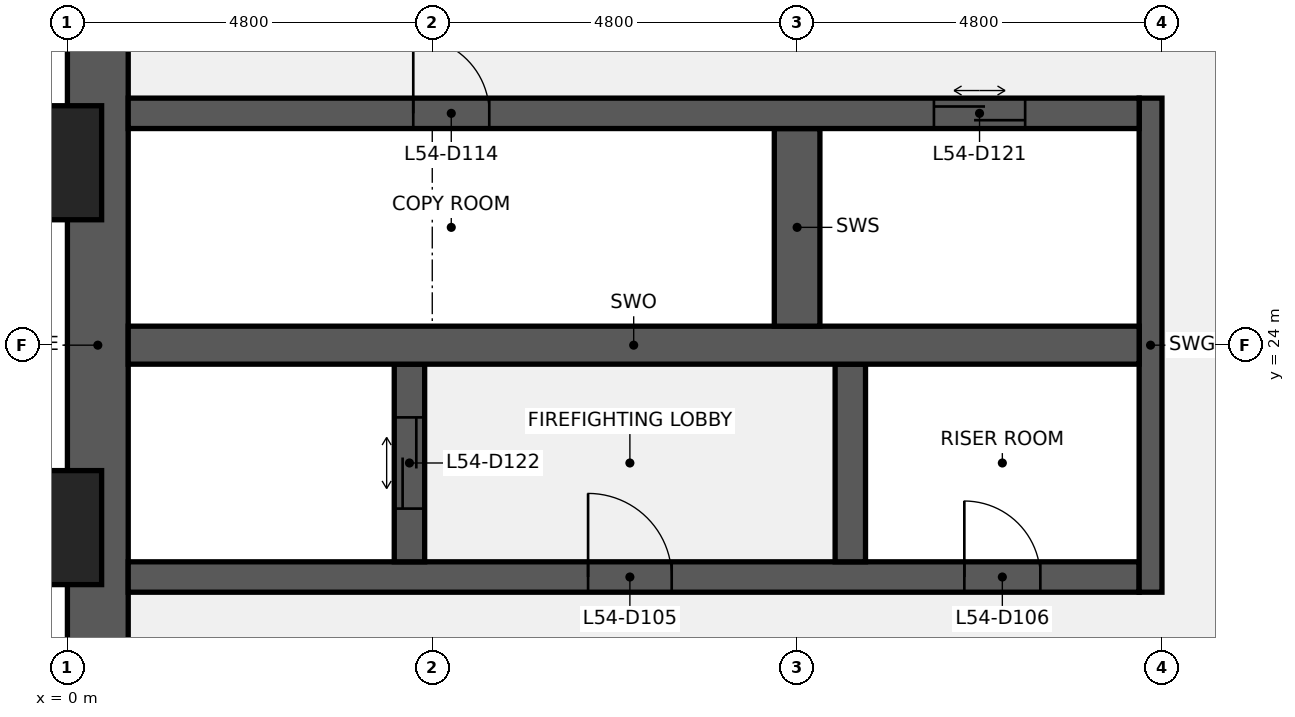
"""IFC4 building model, lengths in metres.
Left out: names, types, materials, properties, quantities, classifications, styles, units other than length and angle.
Written with IfcOpenShell. Run it as: python <this file> out.ifc"""

import sys

from ifc_helpers import new_model, si_unit, direction, frame, frame_2d, origin, origin_2d, place, context, subcontext, project, spatial, rectangle, extrude, element, fill, save


model = new_model("IFC4")
c1 = context("Model", 3, precision=1e-05, world=origin(), true_north=direction((0.0, 1.0)))
c2 = subcontext(c1, "Body", "Model", "MODEL_VIEW")
j1 = project(units=[si_unit("LENGTHUNIT", "METRE"), si_unit("PLANEANGLEUNIT", "RADIAN")], contexts=[c1])
p1 = place(None, origin())
s1 = spatial("IfcSite", under=j1, at=p1, CompositionType="ELEMENT")
p2 = place(p1, origin())
s2 = spatial("IfcBuilding", under=s1, at=p2, CompositionType="ELEMENT")
p3 = place(p2, frame((0.0, 0.0, 245.2)))
s3 = spatial("IfcBuildingStorey", under=s2, at=p3, CompositionType="ELEMENT", Elevation=245.2)
p4 = place(p3, frame((0.4, 9.6, 0.0), z_axis=(0.0, 0.0, 1.0), x_axis=(0.0, 1.0, 0.0)))
e1 = element("IfcWall", 1, at=p4, inside=s3, PredefinedType="SHEAR", context=c2, shape_type="SweptSolid", body=[
    extrude(rectangle(XDim=28.8, YDim=0.8, at=frame_2d((14.4, 0.0))), origin(), (0.0, 0.0, 1.0), 3.84),
])
p5 = place(p4, frame((8.85, 0.0, 0.9)))
e2 = element("IfcOpeningElement", 2, at=p5, cuts=e1, PredefinedType="OPENING", context=c2, shape_type="SweptSolid", body=[
    extrude(rectangle(XDim=1.5, YDim=1.5, at=frame_2d((0.75, 0.75))), frame((0.0, 0.41, 0.0), z_axis=(0.0, -1.0, 0.0), x_axis=(1.0, 0.0, 0.0)), (0.0, 0.0, 1.0), 0.82),
])
p6 = place(p4, frame((18.45, 0.0, 0.9)))
e3 = element("IfcOpeningElement", 3, at=p6, cuts=e1, PredefinedType="OPENING", context=c2, shape_type="SweptSolid", body=[
    extrude(rectangle(XDim=1.5, YDim=1.5, at=frame_2d((0.75, 0.75))), frame((0.0, 0.41, 0.0), z_axis=(0.0, -1.0, 0.0), x_axis=(1.0, 0.0, 0.0)), (0.0, 0.0, 1.0), 0.82),
])
p7 = place(p3, frame((0.8, 20.95, 0.0), z_axis=(0.0, 0.0, 1.0), x_axis=(1.0, 0.0, 0.0)))
e4 = element("IfcWall", 4, at=p7, inside=s3, PredefinedType="SHEAR", context=c2, shape_type="SweptSolid", body=[
    extrude(rectangle(XDim=13.3, YDim=0.4, at=frame_2d((6.65, 0.0))), origin(), (0.0, 0.0, 1.0), 3.84),
])
p8 = place(p7, frame((6.05, 0.0, 0.0)))
e5 = element("IfcOpeningElement", 5, at=p8, cuts=e4, PredefinedType="OPENING", context=c2, shape_type="SweptSolid", body=[
    extrude(rectangle(XDim=1.1, YDim=2.1, at=frame_2d((0.55, 1.05))), frame((0.0, 0.21, 0.0), z_axis=(0.0, -1.0, 0.0), x_axis=(1.0, 0.0, 0.0)), (0.0, 0.0, 1.0), 0.42),
])
p9 = place(p7, frame((11.0, 0.0, 0.0)))
e6 = element("IfcOpeningElement", 6, at=p9, cuts=e4, PredefinedType="OPENING", context=c2, shape_type="SweptSolid", body=[
    extrude(rectangle(XDim=1.0, YDim=2.1, at=frame_2d((0.5, 1.05))), frame((0.0, 0.21, 0.0), z_axis=(0.0, -1.0, 0.0), x_axis=(1.0, 0.0, 0.0)), (0.0, 0.0, 1.0), 0.42),
])
p10 = place(p3, frame((14.25, 20.75, 0.0), z_axis=(0.0, 0.0, 1.0), x_axis=(0.0, 1.0, 0.0)))
e7 = element("IfcWall", 7, at=p10, inside=s3, PredefinedType="SHEAR", context=c2, shape_type="SweptSolid", body=[
    extrude(rectangle(XDim=6.5, YDim=0.3, at=frame_2d((3.25, 0.0))), origin(), (0.0, 0.0, 1.0), 3.84),
])
p11 = place(p3, frame((4.5, 21.15, 0.0), z_axis=(0.0, 0.0, 1.0), x_axis=(0.0, 1.0, 0.0)))
e8 = element("IfcWall", 8, at=p11, inside=s3, PredefinedType="SHEAR", context=c2, shape_type="SweptSolid", body=[
    extrude(rectangle(XDim=2.6, YDim=0.4, at=frame_2d((1.3, 0.0))), origin(), (0.0, 0.0, 1.0), 3.84),
])
p12 = place(p11, frame((0.7, 0.0, 0.0)))
e9 = element("IfcOpeningElement", 9, at=p12, cuts=e8, PredefinedType="OPENING", context=c2, shape_type="SweptSolid", body=[
    extrude(rectangle(XDim=1.2, YDim=2.1, at=frame_2d((0.6, 1.05))), frame((0.0, 0.21, 0.0), z_axis=(0.0, -1.0, 0.0), x_axis=(1.0, 0.0, 0.0)), (0.0, 0.0, 1.0), 0.42),
])
p13 = place(p3, frame((10.3, 21.15, 0.0), z_axis=(0.0, 0.0, 1.0), x_axis=(0.0, 1.0, 0.0)))
e10 = element("IfcWall", 10, at=p13, inside=s3, PredefinedType="SHEAR", context=c2, shape_type="SweptSolid", body=[
    extrude(rectangle(XDim=2.6, YDim=0.4, at=frame_2d((1.3, 0.0))), origin(), (0.0, 0.0, 1.0), 3.84),
])
p14 = place(p3, frame((0.8, 24.0, 0.0), z_axis=(0.0, 0.0, 1.0), x_axis=(1.0, 0.0, 0.0)))
e11 = element("IfcWall", 11, at=p14, inside=s3, PredefinedType="SHEAR", context=c2, shape_type="SweptSolid", body=[
    extrude(rectangle(XDim=13.3, YDim=0.5, at=frame_2d((6.65, 0.0))), origin(), (0.0, 0.0, 1.0), 3.84),
])
p15 = place(p3, frame((9.6, 24.25, 0.0), z_axis=(0.0, 0.0, 1.0), x_axis=(0.0, 1.0, 0.0)))
e12 = element("IfcWall", 12, at=p15, inside=s3, PredefinedType="SHEAR", context=c2, shape_type="SweptSolid", body=[
    extrude(rectangle(XDim=2.6, YDim=0.6, at=frame_2d((1.3, 0.0))), origin(), (0.0, 0.0, 1.0), 3.84),
])
p16 = place(p3, frame((0.8, 27.05, 0.0), z_axis=(0.0, 0.0, 1.0), x_axis=(1.0, 0.0, 0.0)))
e13 = element("IfcWall", 13, at=p16, inside=s3, PredefinedType="SHEAR", context=c2, shape_type="SweptSolid", body=[
    extrude(rectangle(XDim=13.3, YDim=0.4, at=frame_2d((6.65, 0.0))), origin(), (0.0, 0.0, 1.0), 3.84),
])
p17 = place(p16, frame((3.75, 0.0, 0.0)))
e14 = element("IfcOpeningElement", 14, at=p17, cuts=e13, PredefinedType="OPENING", context=c2, shape_type="SweptSolid", body=[
    extrude(rectangle(XDim=1.0, YDim=2.1, at=frame_2d((0.5, 1.05))), frame((0.0, 0.21, 0.0), z_axis=(0.0, -1.0, 0.0), x_axis=(1.0, 0.0, 0.0)), (0.0, 0.0, 1.0), 0.42),
])
p18 = place(p16, frame((10.6, 0.0, 0.0)))
e15 = element("IfcOpeningElement", 15, at=p18, cuts=e13, PredefinedType="OPENING", context=c2, shape_type="SweptSolid", body=[
    extrude(rectangle(XDim=1.2, YDim=2.1, at=frame_2d((0.6, 1.05))), frame((0.0, 0.21, 0.0), z_axis=(0.0, -1.0, 0.0), x_axis=(1.0, 0.0, 0.0)), (0.0, 0.0, 1.0), 0.42),
])
for number, where, z_axis, x_axis in (
    (16, (-0.75, 21.6, 0.0), (0.0, 0.0, 1.0), (0.0, 1.0, 0.0)),
    (17, (-0.75, 26.4, 0.0), (0.0, 0.0, 1.0), (0.0, 1.0, 0.0)),
):
    element("IfcColumn", number, at=place(p3, frame(where, z_axis=z_axis, x_axis=x_axis)), inside=s3, PredefinedType="PILASTER", context=c2, shape_type="SweptSolid", body=[
        extrude(rectangle(XDim=2.4, YDim=1.5, at=origin_2d()), origin(), (0.0, 0.0, 1.0), 4.0),
    ])
p19 = place(p8, origin())
e18 = element("IfcDoor", 18, at=p19, inside=s3, OperationType="SINGLE_SWING_LEFT", PredefinedType="DOOR", context=c2, shape_type="SweptSolid", body=[
    extrude(rectangle(XDim=1.1, YDim=2.1, at=frame_2d((0.55, 1.05))), frame((0.0, 0.025, 0.0), z_axis=(0.0, -1.0, 0.0), x_axis=(1.0, 0.0, 0.0)), (0.0, 0.0, 1.0), 0.05),
])
fill(e5, e18)
p20 = place(p9, origin())
e19 = element("IfcDoor", 19, at=p20, inside=s3, OperationType="SINGLE_SWING_LEFT", PredefinedType="DOOR", context=c2, shape_type="SweptSolid", body=[
    extrude(rectangle(XDim=1.0, YDim=2.1, at=frame_2d((0.5, 1.05))), frame((0.0, 0.025, 0.0), z_axis=(0.0, -1.0, 0.0), x_axis=(1.0, 0.0, 0.0)), (0.0, 0.0, 1.0), 0.05),
])
fill(e6, e19)
p21 = place(p17, origin())
e20 = element("IfcDoor", 20, at=p21, inside=s3, OperationType="SINGLE_SWING_LEFT", PredefinedType="DOOR", context=c2, shape_type="SweptSolid", body=[
    extrude(rectangle(XDim=1.0, YDim=2.1, at=frame_2d((0.5, 1.05))), frame((0.0, 0.025, 0.0), z_axis=(0.0, -1.0, 0.0), x_axis=(1.0, 0.0, 0.0)), (0.0, 0.0, 1.0), 0.05),
])
fill(e14, e20)
p22 = place(p18, origin())
e21 = element("IfcDoor", 21, at=p22, inside=s3, OperationType="DOUBLE_DOOR_SLIDING", PredefinedType="DOOR", context=c2, shape_type="SweptSolid", body=[
    extrude(rectangle(XDim=1.2, YDim=2.1, at=frame_2d((0.6, 1.05))), frame((0.0, 0.025, 0.0), z_axis=(0.0, -1.0, 0.0), x_axis=(1.0, 0.0, 0.0)), (0.0, 0.0, 1.0), 0.05),
])
fill(e15, e21)
p23 = place(p12, origin())
e22 = element("IfcDoor", 22, at=p23, inside=s3, OperationType="DOUBLE_DOOR_SLIDING", PredefinedType="DOOR", context=c2, shape_type="SweptSolid", body=[
    extrude(rectangle(XDim=1.2, YDim=2.1, at=frame_2d((0.6, 1.05))), frame((0.0, 0.025, 0.0), z_axis=(0.0, -1.0, 0.0), x_axis=(1.0, 0.0, 0.0)), (0.0, 0.0, 1.0), 0.05),
])
fill(e9, e22)
save(model, sys.argv[1])
